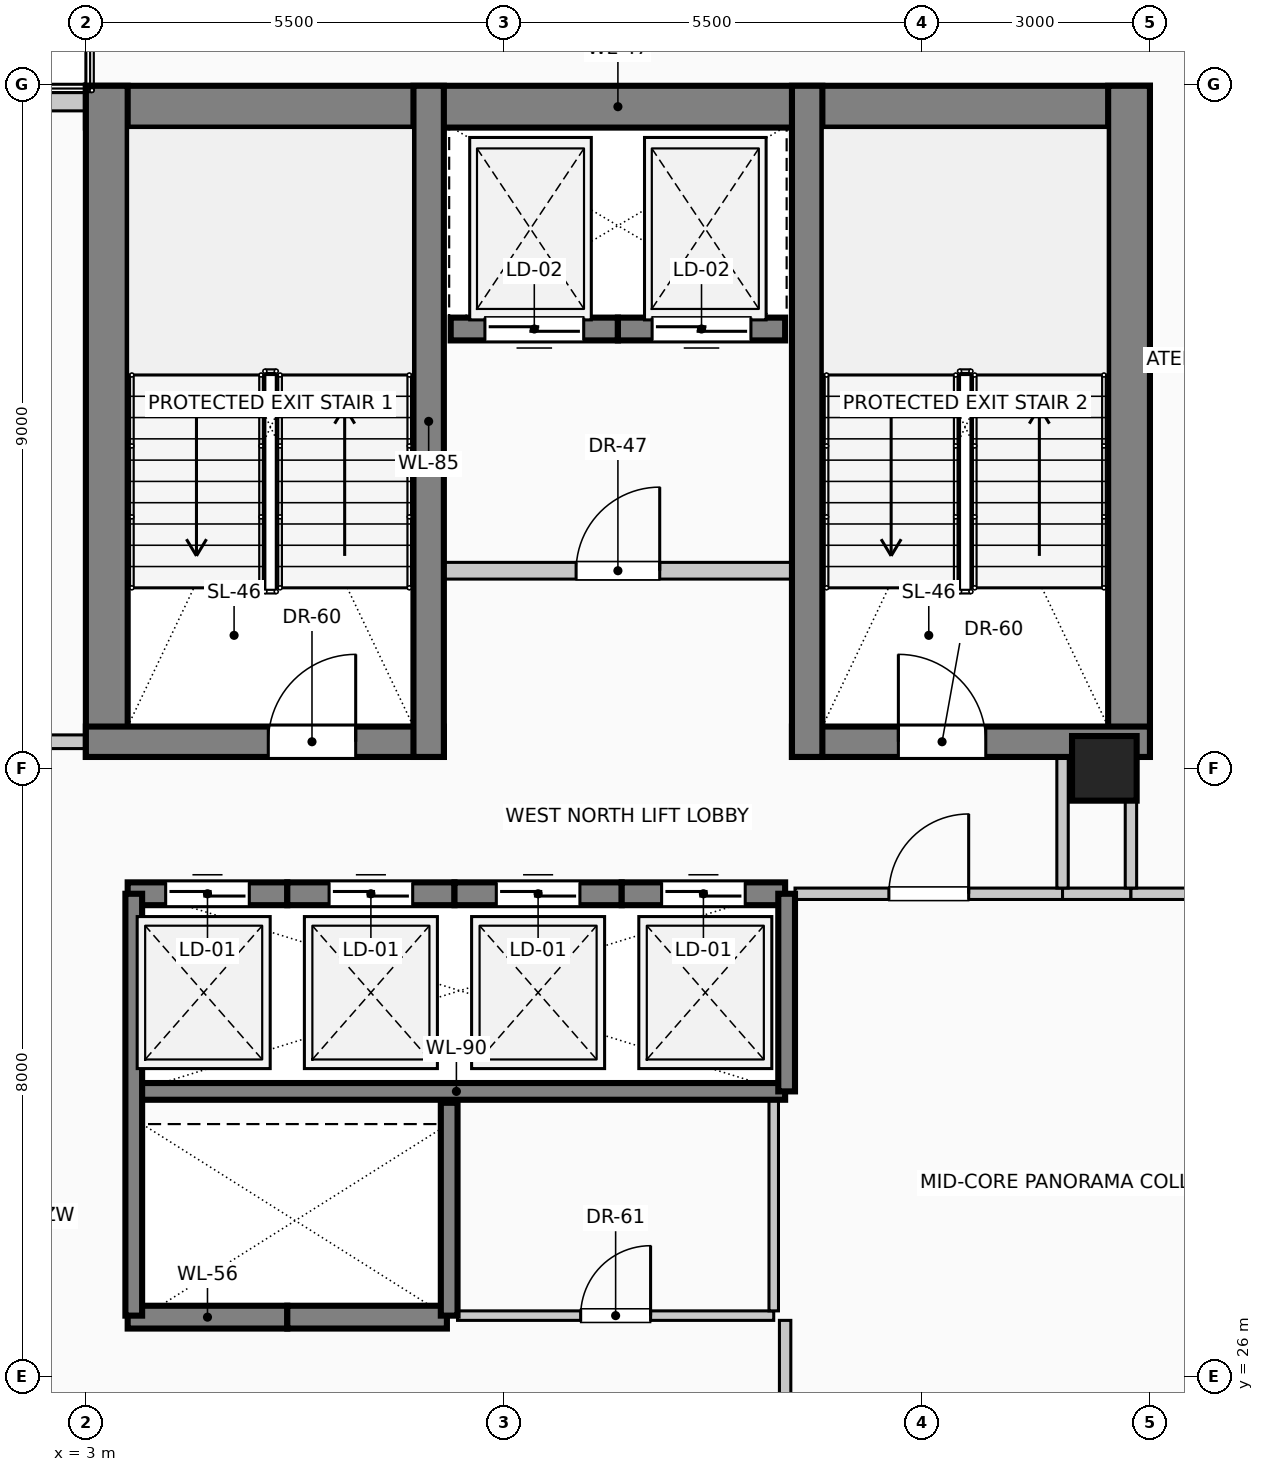
"""IFC4 building model, lengths in metres.
Left out: names, types, materials, properties, quantities, classifications, styles, units other than length and angle.
Written with IfcOpenShell. Run it as: python <this file> out.ifc"""

import sys

from ifc_helpers import new_model, si_unit, direction, frame, frame_2d, origin, origin_2d, place, context, subcontext, project, spatial, rectangle, circle, extrude, element, fill, save


model = new_model("IFC4")
c1 = context("Model", 3, precision=1e-05, world=origin(), true_north=direction((0.0, 1.0)))
c2 = subcontext(c1, "Body", "Model", "MODEL_VIEW")
j1 = project(units=[si_unit("LENGTHUNIT", "METRE"), si_unit("PLANEANGLEUNIT", "RADIAN")], contexts=[c1])
p1 = place(None, origin())
s1 = spatial("IfcSite", under=j1, at=p1, CompositionType="ELEMENT")
p2 = place(p1, origin())
s2 = spatial("IfcBuilding", under=s1, at=p2, CompositionType="ELEMENT")
p3 = place(p2, frame((0.0, 0.0, 276.6)))
s3 = spatial("IfcBuildingStorey", under=s2, at=p3, CompositionType="ELEMENT", Elevation=276.6)
p4 = place(p3, frame((3.0, 42.705, 0.0), z_axis=(0.0, 0.0, 1.0), x_axis=(1.0, 0.0, 0.0)))
e1 = element("IfcWall", 1, at=p4, inside=s3, PredefinedType="SHEAR", context=c2, shape_type="SweptSolid", body=[
    extrude(rectangle(XDim=14.0, YDim=0.55, at=frame_2d((7.0, 0.0))), origin(), (0.0, 0.0, 1.0), 4.0),
])
for number, where, z_axis, x_axis in (
    (2, (3.275, 34.15, 0.0), (0.0, 0.0, 1.0), (0.0, 1.0, 0.0)),
    (3, (16.725, 34.15, 0.0), (0.0, 0.0, 1.0), (0.0, 1.0, 0.0)),
):
    element("IfcWall", number, at=place(p3, frame(where, z_axis=z_axis, x_axis=x_axis)), inside=s3, PredefinedType="SHEAR", context=c2, shape_type="SweptSolid", body=[
        extrude(rectangle(XDim=8.83, YDim=0.55, at=frame_2d((4.415, 0.0))), origin(), (0.0, 0.0, 1.0), 4.0),
    ])
p5 = place(p3, frame((3.0, 34.35, 0.0), z_axis=(0.0, 0.0, 1.0), x_axis=(1.0, 0.0, 0.0)))
e4 = element("IfcWall", 4, at=p5, inside=s3, PredefinedType="SHEAR", context=c2, shape_type="SweptSolid", body=[
    extrude(rectangle(XDim=4.71, YDim=0.4, at=frame_2d((2.355, 0.0))), origin(), (0.0, 0.0, 1.0), 4.0),
])
p6 = place(p5, frame((2.4, 0.0, 0.0)))
e5 = element("IfcOpeningElement", 5, at=p6, cuts=e4, PredefinedType="OPENING", context=c2, shape_type="SweptSolid", body=[
    extrude(rectangle(XDim=1.15, YDim=2.2, at=frame_2d((0.575, 1.1))), frame((0.0, 0.21, 0.0), z_axis=(0.0, -1.0, 0.0), x_axis=(1.0, 0.0, 0.0)), (0.0, 0.0, 1.0), 0.42),
])
p7 = place(p3, frame((12.29, 34.35, 0.0), z_axis=(0.0, 0.0, 1.0), x_axis=(1.0, 0.0, 0.0)))
e6 = element("IfcWall", 6, at=p7, inside=s3, PredefinedType="SHEAR", context=c2, shape_type="SweptSolid", body=[
    extrude(rectangle(XDim=4.71, YDim=0.4, at=frame_2d((2.355, 0.0))), origin(), (0.0, 0.0, 1.0), 4.0),
])
p8 = place(p7, frame((1.4, 0.0, 0.0)))
e7 = element("IfcOpeningElement", 7, at=p8, cuts=e6, PredefinedType="OPENING", context=c2, shape_type="SweptSolid", body=[
    extrude(rectangle(XDim=1.15, YDim=2.2, at=frame_2d((0.575, 1.1))), frame((0.0, 0.21, 0.0), z_axis=(0.0, -1.0, 0.0), x_axis=(1.0, 0.0, 0.0)), (0.0, 0.0, 1.0), 0.42),
])
for number, where, z_axis, x_axis in (
    (8, (7.51, 34.15, 0.0), (0.0, 0.0, 1.0), (0.0, 1.0, 0.0)),
    (9, (12.49, 34.15, 0.0), (0.0, 0.0, 1.0), (0.0, 1.0, 0.0)),
):
    element("IfcWall", number, at=place(p3, frame(where, z_axis=z_axis, x_axis=x_axis)), inside=s3, PredefinedType="SHEAR", context=c2, shape_type="SweptSolid", body=[
        extrude(rectangle(XDim=8.83, YDim=0.4, at=frame_2d((4.415, 0.0))), origin(), (0.0, 0.0, 1.0), 4.0),
    ])
p9 = place(p3, frame((16.4, 34.0, 0.0), z_axis=(0.0, 0.0, 1.0), x_axis=(1.0, 0.0, 0.0)))
e10 = element("IfcColumn", 10, at=p9, inside=s3, PredefinedType="COLUMN", context=c2, shape_type="SweptSolid", body=[
    extrude(circle(Radius=0.425, at=origin_2d()), origin(), (0.0, 0.0, 1.0), 4.0),
])
p10 = place(p3, frame((0.6, 42.77, 0.0), z_axis=(0.0, 0.0, 1.0), x_axis=(1.0, 0.0, 0.0)))
e11 = element("IfcWall", 11, at=p10, inside=s3, PredefinedType="SOLIDWALL", context=c2, shape_type="SweptSolid", body=[
    extrude(rectangle(XDim=2.395, YDim=0.24, at=frame_2d((1.198, 0.0))), origin(), (0.0, 0.0, 1.0), 3.66),
])
p11 = place(p3, frame((3.55, 32.35, 0.0), z_axis=(0.0, 0.0, 1.0), x_axis=(1.0, 0.0, 0.0)))
e12 = element("IfcWall", 12, at=p11, inside=s3, PredefinedType="SOLIDWALL", context=c2, shape_type="SweptSolid", body=[
    extrude(rectangle(XDim=2.1, YDim=0.3, at=frame_2d((1.05, 0.0))), origin(), (0.0, 0.0, 1.0), 4.0),
])
p12 = place(p11, frame((0.5, 0.0, 0.0)))
e13 = element("IfcOpeningElement", 13, at=p12, cuts=e12, PredefinedType="OPENING", context=c2, shape_type="SweptSolid", body=[
    extrude(rectangle(XDim=1.1, YDim=2.2, at=frame_2d((0.55, 1.1))), frame((0.0, 0.16, 0.0), z_axis=(0.0, -1.0, 0.0), x_axis=(1.0, 0.0, 0.0)), (0.0, 0.0, 1.0), 0.32),
])
p13 = place(p3, frame((5.65, 32.35, 0.0), z_axis=(0.0, 0.0, 1.0), x_axis=(1.0, 0.0, 0.0)))
e14 = element("IfcWall", 14, at=p13, inside=s3, PredefinedType="SOLIDWALL", context=c2, shape_type="SweptSolid", body=[
    extrude(rectangle(XDim=2.2, YDim=0.3, at=frame_2d((1.1, 0.0))), origin(), (0.0, 0.0, 1.0), 4.0),
])
p14 = place(p13, frame((0.55, 0.0, 0.0)))
e15 = element("IfcOpeningElement", 15, at=p14, cuts=e14, PredefinedType="OPENING", context=c2, shape_type="SweptSolid", body=[
    extrude(rectangle(XDim=1.1, YDim=2.2, at=frame_2d((0.55, 1.1))), frame((0.0, 0.16, 0.0), z_axis=(0.0, -1.0, 0.0), x_axis=(1.0, 0.0, 0.0)), (0.0, 0.0, 1.0), 0.32),
])
p15 = place(p3, frame((7.85, 32.35, 0.0), z_axis=(0.0, 0.0, 1.0), x_axis=(1.0, 0.0, 0.0)))
e16 = element("IfcWall", 16, at=p15, inside=s3, PredefinedType="SOLIDWALL", context=c2, shape_type="SweptSolid", body=[
    extrude(rectangle(XDim=2.2, YDim=0.3, at=frame_2d((1.1, 0.0))), origin(), (0.0, 0.0, 1.0), 4.0),
])
p16 = place(p15, frame((0.55, 0.0, 0.0)))
e17 = element("IfcOpeningElement", 17, at=p16, cuts=e16, PredefinedType="OPENING", context=c2, shape_type="SweptSolid", body=[
    extrude(rectangle(XDim=1.1, YDim=2.2, at=frame_2d((0.55, 1.1))), frame((0.0, 0.16, 0.0), z_axis=(0.0, -1.0, 0.0), x_axis=(1.0, 0.0, 0.0)), (0.0, 0.0, 1.0), 0.32),
])
p17 = place(p3, frame((10.05, 32.35, 0.0), z_axis=(0.0, 0.0, 1.0), x_axis=(1.0, 0.0, 0.0)))
e18 = element("IfcWall", 18, at=p17, inside=s3, PredefinedType="SOLIDWALL", context=c2, shape_type="SweptSolid", body=[
    extrude(rectangle(XDim=2.15, YDim=0.3, at=frame_2d((1.075, 0.0))), origin(), (0.0, 0.0, 1.0), 4.0),
])
p18 = place(p17, frame((0.525, 0.0, 0.0)))
e19 = element("IfcOpeningElement", 19, at=p18, cuts=e18, PredefinedType="OPENING", context=c2, shape_type="SweptSolid", body=[
    extrude(rectangle(XDim=1.1, YDim=2.2, at=frame_2d((0.55, 1.1))), frame((0.0, 0.16, 0.0), z_axis=(0.0, -1.0, 0.0), x_axis=(1.0, 0.0, 0.0)), (0.0, 0.0, 1.0), 0.32),
])
p19 = place(p3, frame((5.65, 26.78, 0.0), z_axis=(0.0, 0.0, 1.0), x_axis=(-1.0, 0.0, 0.0)))
e20 = element("IfcWall", 20, at=p19, inside=s3, PredefinedType="SOLIDWALL", context=c2, shape_type="SweptSolid", body=[
    extrude(rectangle(XDim=2.1, YDim=0.3, at=frame_2d((1.05, 0.0))), origin(), (0.0, 0.0, 1.0), 4.0),
])
p20 = place(p3, frame((7.75, 26.78, 0.0), z_axis=(0.0, 0.0, 1.0), x_axis=(-1.0, 0.0, 0.0)))
e21 = element("IfcWall", 21, at=p20, inside=s3, PredefinedType="SOLIDWALL", context=c2, shape_type="SweptSolid", body=[
    extrude(rectangle(XDim=2.1, YDim=0.3, at=frame_2d((1.05, 0.0))), origin(), (0.0, 0.0, 1.0), 4.0),
])
p21 = place(p3, frame((10.0, 39.78, 0.0), z_axis=(0.0, 0.0, 1.0), x_axis=(-1.0, 0.0, 0.0)))
e22 = element("IfcWall", 22, at=p21, inside=s3, PredefinedType="SOLIDWALL", context=c2, shape_type="SweptSolid", body=[
    extrude(rectangle(XDim=2.2, YDim=0.3, at=frame_2d((1.1, 0.0))), origin(), (0.0, 0.0, 1.0), 4.0),
])
p22 = place(p21, frame((0.45, 0.0, 0.0)))
e23 = element("IfcOpeningElement", 23, at=p22, cuts=e22, PredefinedType="OPENING", context=c2, shape_type="SweptSolid", body=[
    extrude(rectangle(XDim=1.3, YDim=2.25, at=frame_2d((0.65, 1.125))), frame((0.0, 0.16, 0.0), z_axis=(0.0, -1.0, 0.0), x_axis=(1.0, 0.0, 0.0)), (0.0, 0.0, 1.0), 0.32),
])
p23 = place(p3, frame((12.2, 39.78, 0.0), z_axis=(0.0, 0.0, 1.0), x_axis=(-1.0, 0.0, 0.0)))
e24 = element("IfcWall", 24, at=p23, inside=s3, PredefinedType="SOLIDWALL", context=c2, shape_type="SweptSolid", body=[
    extrude(rectangle(XDim=2.2, YDim=0.3, at=frame_2d((1.1, 0.0))), origin(), (0.0, 0.0, 1.0), 4.0),
])
p24 = place(p23, frame((0.45, 0.0, 0.0)))
e25 = element("IfcOpeningElement", 25, at=p24, cuts=e24, PredefinedType="OPENING", context=c2, shape_type="SweptSolid", body=[
    extrude(rectangle(XDim=1.3, YDim=2.25, at=frame_2d((0.65, 1.125))), frame((0.0, 0.16, 0.0), z_axis=(0.0, -1.0, 0.0), x_axis=(1.0, 0.0, 0.0)), (0.0, 0.0, 1.0), 0.32),
])
p25 = place(p3, frame((3.55, 29.75, 0.0), z_axis=(0.0, 0.0, 1.0), x_axis=(1.0, 0.0, 0.0)))
e26 = element("IfcWall", 26, at=p25, inside=s3, PredefinedType="SOLIDWALL", context=c2, shape_type="SweptSolid", body=[
    extrude(rectangle(XDim=8.65, YDim=0.22, at=frame_2d((4.325, 0.0))), origin(), (0.0, 0.0, 1.0), 4.0),
])
p26 = place(p3, frame((3.63, 26.8, 0.0), z_axis=(0.0, 0.0, 1.0), x_axis=(0.0, 1.0, 0.0)))
e27 = element("IfcWall", 27, at=p26, inside=s3, PredefinedType="SOLIDWALL", context=c2, shape_type="SweptSolid", body=[
    extrude(rectangle(XDim=5.55, YDim=0.22, at=frame_2d((2.775, 0.0))), origin(), (0.0, 0.0, 1.0), 4.0),
])
p27 = place(p3, frame((7.78, 26.8, 0.0), z_axis=(0.0, 0.0, 1.0), x_axis=(0.0, 1.0, 0.0)))
e28 = element("IfcWall", 28, at=p27, inside=s3, PredefinedType="SOLIDWALL", context=c2, shape_type="SweptSolid", body=[
    extrude(rectangle(XDim=2.8, YDim=0.22, at=frame_2d((1.4, 0.0))), origin(), (0.0, 0.0, 1.0), 4.0),
])
p28 = place(p3, frame((12.22, 29.75, 0.0), z_axis=(0.0, 0.0, 1.0), x_axis=(0.0, 1.0, 0.0)))
e29 = element("IfcWall", 29, at=p28, inside=s3, PredefinedType="SOLIDWALL", context=c2, shape_type="SweptSolid", body=[
    extrude(rectangle(XDim=2.6, YDim=0.22, at=frame_2d((1.3, 0.0))), origin(), (0.0, 0.0, 1.0), 4.0),
])
p29 = place(p3, frame((7.51, 36.6, 0.0), z_axis=(0.0, 0.0, 1.0), x_axis=(1.0, 0.0, 0.0)))
e30 = element("IfcWall", 30, at=p29, inside=s3, PredefinedType="PARTITIONING", context=c2, shape_type="SweptSolid", body=[
    extrude(rectangle(XDim=4.98, YDim=0.22, at=frame_2d((2.49, 0.0))), origin(), (0.0, 0.0, 1.0), 3.66),
])
p30 = place(p29, frame((1.94, 0.0, 0.0)))
e31 = element("IfcOpeningElement", 31, at=p30, cuts=e30, PredefinedType="OPENING", context=c2, shape_type="SweptSolid", body=[
    extrude(rectangle(XDim=1.1, YDim=2.2, at=frame_2d((0.55, 1.1))), frame((0.0, 0.12, 0.0), z_axis=(0.0, -1.0, 0.0), x_axis=(1.0, 0.0, 0.0)), (0.0, 0.0, 1.0), 0.24),
])
p31 = place(p3, frame((7.89, 26.8, 0.0), z_axis=(0.0, 0.0, 1.0), x_axis=(1.0, 0.0, 0.0)))
e32 = element("IfcWall", 32, at=p31, inside=s3, PredefinedType="PARTITIONING", context=c2, shape_type="SweptSolid", body=[
    extrude(rectangle(XDim=4.16, YDim=0.125, at=frame_2d((2.08, 0.0))), origin(), (0.0, 0.0, 1.0), 3.66),
])
p32 = place(p31, frame((1.62, 0.0, 0.0)))
e33 = element("IfcOpeningElement", 33, at=p32, cuts=e32, PredefinedType="OPENING", context=c2, shape_type="SweptSolid", body=[
    extrude(rectangle(XDim=0.92, YDim=2.1, at=frame_2d((0.46, 1.05))), frame((0.0, 0.073, 0.0), z_axis=(0.0, -1.0, 0.0), x_axis=(1.0, 0.0, 0.0)), (0.0, 0.0, 1.0), 0.145),
])
p33 = place(p3, frame((12.33, 32.35, 0.0), z_axis=(0.0, 0.0, 1.0), x_axis=(1.0, 0.0, 0.0)))
e34 = element("IfcWall", 34, at=p33, inside=s3, PredefinedType="PARTITIONING", context=c2, shape_type="SweptSolid", body=[
    extrude(rectangle(XDim=3.52, YDim=0.15, at=frame_2d((1.76, 0.0))), origin(), (0.0, 0.0, 1.0), 3.66),
])
p34 = place(p33, frame((1.235, 0.0, 0.0)))
e35 = element("IfcOpeningElement", 35, at=p34, cuts=e34, PredefinedType="OPENING", context=c2, shape_type="SweptSolid", body=[
    extrude(rectangle(XDim=1.05, YDim=2.15, at=frame_2d((0.525, 1.075))), frame((0.0, 0.085, 0.0), z_axis=(0.0, -1.0, 0.0), x_axis=(1.0, 0.0, 0.0)), (0.0, 0.0, 1.0), 0.17),
])
p35 = place(p3, frame((15.85, 32.35, 0.0), z_axis=(0.0, 0.0, 1.0), x_axis=(1.0, 0.0, 0.0)))
e36 = element("IfcWall", 36, at=p35, inside=s3, PredefinedType="PARTITIONING", context=c2, shape_type="SweptSolid", body=[
    extrude(rectangle(XDim=0.9, YDim=0.15, at=frame_2d((0.45, 0.0))), origin(), (0.0, 0.0, 1.0), 3.66),
])
p36 = place(p3, frame((16.75, 32.35, 0.0), z_axis=(0.0, 0.0, 1.0), x_axis=(1.0, 0.0, 0.0)))
e37 = element("IfcWall", 37, at=p36, inside=s3, PredefinedType="PARTITIONING", context=c2, shape_type="SweptSolid", body=[
    extrude(rectangle(XDim=4.25, YDim=0.15, at=frame_2d((2.125, 0.0))), origin(), (0.0, 0.0, 1.0), 3.66),
])
p37 = place(p3, frame((1.075, 34.35, 0.0), z_axis=(0.0, 0.0, 1.0), x_axis=(1.0, 0.0, 0.0)))
e38 = element("IfcWall", 38, at=p37, inside=s3, PredefinedType="PARTITIONING", context=c2, shape_type="SweptSolid", body=[
    extrude(rectangle(XDim=1.925, YDim=0.18, at=frame_2d((0.962, 0.0))), origin(), (0.0, 0.0, 1.0), 3.66),
])
p38 = place(p3, frame((12.05, 26.863, 0.0), z_axis=(0.0, 0.0, 1.0), x_axis=(0.0, 1.0, 0.0)))
e39 = element("IfcWall", 39, at=p38, inside=s3, PredefinedType="PARTITIONING", context=c2, shape_type="SweptSolid", body=[
    extrude(rectangle(XDim=2.777, YDim=0.125, at=frame_2d((1.389, 0.0))), origin(), (0.0, 0.0, 1.0), 3.66),
])
p39 = place(p3, frame((12.2, 24.863, 0.0), z_axis=(0.0, 0.0, 1.0), x_axis=(0.0, 1.0, 0.0)))
e40 = element("IfcWall", 40, at=p39, inside=s3, PredefinedType="PARTITIONING", context=c2, shape_type="SweptSolid", body=[
    extrude(rectangle(XDim=1.875, YDim=0.15, at=frame_2d((0.938, 0.0))), origin(), (0.0, 0.0, 1.0), 3.66),
])
p40 = place(p3, frame((15.85, 32.425, 0.0), z_axis=(0.0, 0.0, 1.0), x_axis=(0.0, 1.0, 0.0)))
e41 = element("IfcWall", 41, at=p40, inside=s3, PredefinedType="PARTITIONING", context=c2, shape_type="SweptSolid", body=[
    extrude(rectangle(XDim=1.725, YDim=0.15, at=frame_2d((0.862, 0.0))), origin(), (0.0, 0.0, 1.0), 3.66),
])
p41 = place(p3, frame((16.75, 32.425, 0.0), z_axis=(0.0, 0.0, 1.0), x_axis=(0.0, 1.0, 0.0)))
e42 = element("IfcWall", 42, at=p41, inside=s3, PredefinedType="PARTITIONING", context=c2, shape_type="SweptSolid", body=[
    extrude(rectangle(XDim=1.15, YDim=0.15, at=frame_2d((0.575, 0.0))), origin(), (0.0, 0.0, 1.0), 3.66),
])
p42 = place(p12, origin())
e43 = element("IfcDoor", 43, at=p42, inside=s3, OperationType="SLIDING_TO_LEFT", PredefinedType="DOOR", context=c2, shape_type="SweptSolid", body=[
    extrude(rectangle(XDim=1.1, YDim=2.2, at=frame_2d((0.55, 1.1))), frame((0.0, 0.025, 0.0), z_axis=(0.0, -1.0, 0.0), x_axis=(1.0, 0.0, 0.0)), (0.0, 0.0, 1.0), 0.05),
])
fill(e13, e43)
p43 = place(p14, origin())
e44 = element("IfcDoor", 44, at=p43, inside=s3, OperationType="SLIDING_TO_RIGHT", PredefinedType="DOOR", context=c2, shape_type="SweptSolid", body=[
    extrude(rectangle(XDim=1.1, YDim=2.2, at=frame_2d((0.55, 1.1))), frame((0.0, 0.025, 0.0), z_axis=(0.0, -1.0, 0.0), x_axis=(1.0, 0.0, 0.0)), (0.0, 0.0, 1.0), 0.05),
])
fill(e15, e44)
p44 = place(p16, origin())
e45 = element("IfcDoor", 45, at=p44, inside=s3, OperationType="SLIDING_TO_LEFT", PredefinedType="DOOR", context=c2, shape_type="SweptSolid", body=[
    extrude(rectangle(XDim=1.1, YDim=2.2, at=frame_2d((0.55, 1.1))), frame((0.0, 0.025, 0.0), z_axis=(0.0, -1.0, 0.0), x_axis=(1.0, 0.0, 0.0)), (0.0, 0.0, 1.0), 0.05),
])
fill(e17, e45)
p45 = place(p18, origin())
e46 = element("IfcDoor", 46, at=p45, inside=s3, OperationType="SLIDING_TO_RIGHT", PredefinedType="DOOR", context=c2, shape_type="SweptSolid", body=[
    extrude(rectangle(XDim=1.1, YDim=2.2, at=frame_2d((0.55, 1.1))), frame((0.0, 0.025, 0.0), z_axis=(0.0, -1.0, 0.0), x_axis=(1.0, 0.0, 0.0)), (0.0, 0.0, 1.0), 0.05),
])
fill(e19, e46)
p46 = place(p22, origin())
e47 = element("IfcDoor", 47, at=p46, inside=s3, OperationType="SLIDING_TO_LEFT", PredefinedType="DOOR", context=c2, shape_type="SweptSolid", body=[
    extrude(rectangle(XDim=1.3, YDim=2.25, at=frame_2d((0.65, 1.125))), frame((0.0, 0.025, 0.0), z_axis=(0.0, -1.0, 0.0), x_axis=(1.0, 0.0, 0.0)), (0.0, 0.0, 1.0), 0.05),
])
fill(e23, e47)
p47 = place(p24, origin())
e48 = element("IfcDoor", 48, at=p47, inside=s3, OperationType="SLIDING_TO_RIGHT", PredefinedType="DOOR", context=c2, shape_type="SweptSolid", body=[
    extrude(rectangle(XDim=1.3, YDim=2.25, at=frame_2d((0.65, 1.125))), frame((0.0, 0.025, 0.0), z_axis=(0.0, -1.0, 0.0), x_axis=(1.0, 0.0, 0.0)), (0.0, 0.0, 1.0), 0.05),
])
fill(e25, e48)
p48 = place(p6, origin())
e49 = element("IfcDoor", 49, at=p48, inside=s3, OperationType="SINGLE_SWING_RIGHT", PredefinedType="DOOR", context=c2, shape_type="SweptSolid", body=[
    extrude(rectangle(XDim=1.15, YDim=2.2, at=frame_2d((0.575, 1.1))), frame((0.0, 0.025, 0.0), z_axis=(0.0, -1.0, 0.0), x_axis=(1.0, 0.0, 0.0)), (0.0, 0.0, 1.0), 0.05),
])
fill(e5, e49)
p49 = place(p8, origin())
e50 = element("IfcDoor", 50, at=p49, inside=s3, OperationType="SINGLE_SWING_LEFT", PredefinedType="DOOR", context=c2, shape_type="SweptSolid", body=[
    extrude(rectangle(XDim=1.15, YDim=2.2, at=frame_2d((0.575, 1.1))), frame((0.0, 0.025, 0.0), z_axis=(0.0, -1.0, 0.0), x_axis=(1.0, 0.0, 0.0)), (0.0, 0.0, 1.0), 0.05),
])
fill(e7, e50)
p50 = place(p30, origin())
e51 = element("IfcDoor", 51, at=p50, inside=s3, OperationType="SINGLE_SWING_RIGHT", PredefinedType="DOOR", context=c2, shape_type="SweptSolid", body=[
    extrude(rectangle(XDim=1.1, YDim=2.2, at=frame_2d((0.55, 1.1))), frame((0.0, 0.025, 0.0), z_axis=(0.0, -1.0, 0.0), x_axis=(1.0, 0.0, 0.0)), (0.0, 0.0, 1.0), 0.05),
])
fill(e31, e51)
p51 = place(p32, origin())
e52 = element("IfcDoor", 52, at=p51, inside=s3, OperationType="SINGLE_SWING_RIGHT", PredefinedType="DOOR", context=c2, shape_type="SweptSolid", body=[
    extrude(rectangle(XDim=0.92, YDim=2.1, at=frame_2d((0.46, 1.05))), frame((0.0, 0.025, 0.0), z_axis=(0.0, -1.0, 0.0), x_axis=(1.0, 0.0, 0.0)), (0.0, 0.0, 1.0), 0.05),
])
fill(e33, e52)
p52 = place(p34, origin())
e53 = element("IfcDoor", 53, at=p52, inside=s3, OperationType="SINGLE_SWING_RIGHT", PredefinedType="DOOR", context=c2, shape_type="SweptSolid", body=[
    extrude(rectangle(XDim=1.05, YDim=2.15, at=frame_2d((0.525, 1.075))), frame((0.0, 0.025, 0.0), z_axis=(0.0, -1.0, 0.0), x_axis=(1.0, 0.0, 0.0)), (0.0, 0.0, 1.0), 0.05),
])
fill(e35, e53)
save(model, sys.argv[1])
